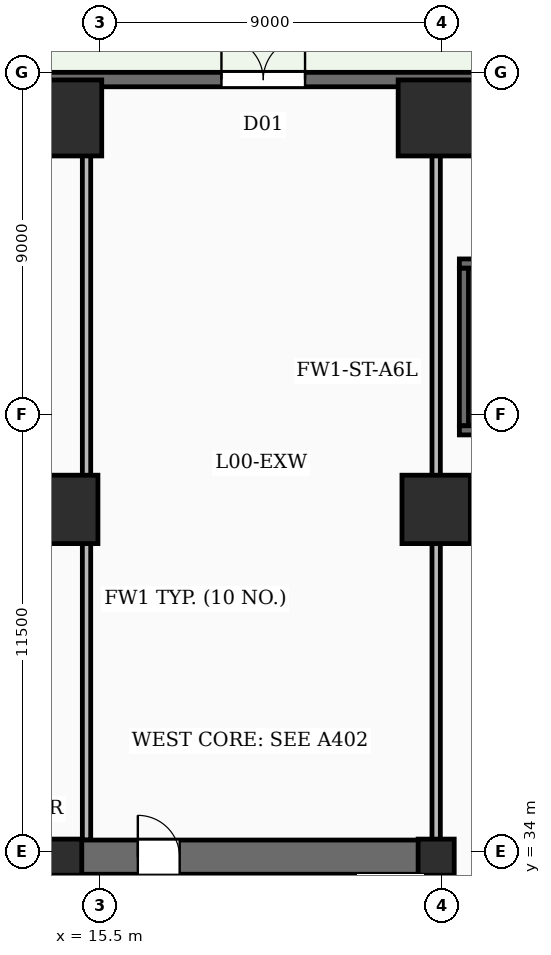
"""IFC4 building model, lengths in metres.
Left out: names, types, materials, properties, quantities, classifications, styles, units other than length and angle.
Written with IfcOpenShell. Run it as: python <this file> out.ifc"""

import sys

from ifc_helpers import new_model, si_unit, direction, frame, frame_2d, origin, origin_2d, place, context, subcontext, project, spatial, rectangle, circle, extrude, element, fill, save


model = new_model("IFC4")
c1 = context("Model", 3, precision=1e-05, world=origin(), true_north=direction((0.0, 1.0)))
c2 = subcontext(c1, "Body", "Model", "MODEL_VIEW")
j1 = project(units=[si_unit("LENGTHUNIT", "METRE"), si_unit("PLANEANGLEUNIT", "RADIAN")], contexts=[c1])
p1 = place(None, origin())
s1 = spatial("IfcSite", under=j1, at=p1, CompositionType="ELEMENT")
p2 = place(p1, origin())
s2 = spatial("IfcBuilding", under=s1, at=p2, CompositionType="ELEMENT")
p3 = place(p2, origin())
s3 = spatial("IfcBuildingStorey", under=s2, at=p3, CompositionType="ELEMENT", Elevation=0.0)
p4 = place(p3, frame((14.55, 19.0, -0.45), z_axis=(0.0, 0.0, 1.0), x_axis=(0.0, 1.0, 0.0)))
e1 = element("IfcWall", 1, at=p4, inside=s3, PredefinedType="SHEAR", context=c2, shape_type="SweptSolid", body=[
    extrude(rectangle(XDim=15.3, YDim=0.9, at=frame_2d((7.65, 0.0))), origin(), (0.0, 0.0, 1.0), 8.1),
])
p5 = place(p3, frame((24.35, 19.0, -0.45), z_axis=(0.0, 0.0, 1.0), x_axis=(0.0, 1.0, 0.0)))
e2 = element("IfcWall", 2, at=p5, inside=s3, PredefinedType="SHEAR", context=c2, shape_type="SweptSolid", body=[
    extrude(rectangle(XDim=15.3, YDim=0.9, at=frame_2d((7.65, 0.0))), origin(), (0.0, 0.0, 1.0), 8.1),
])
p6 = place(p5, frame((2.5, 0.0, 0.45)))
e3 = element("IfcOpeningElement", 3, at=p6, cuts=e2, PredefinedType="OPENING", context=c2, shape_type="SweptSolid", body=[
    extrude(rectangle(XDim=1.05, YDim=2.15, at=frame_2d((0.525, 1.075))), frame((0.0, 0.46, 0.0), z_axis=(0.0, -1.0, 0.0), x_axis=(1.0, 0.0, 0.0)), (0.0, 0.0, 1.0), 0.92),
])
p7 = place(p5, frame((7.0, 0.0, 0.45)))
e4 = element("IfcOpeningElement", 4, at=p7, cuts=e2, PredefinedType="OPENING", context=c2, shape_type="SweptSolid", body=[
    extrude(rectangle(XDim=1.05, YDim=2.15, at=frame_2d((0.525, 1.075))), frame((0.0, 0.46, 0.0), z_axis=(0.0, -1.0, 0.0), x_axis=(1.0, 0.0, 0.0)), (0.0, 0.0, 1.0), 0.92),
])
p8 = place(p3, frame((15.0, 33.85, -0.45), z_axis=(0.0, 0.0, 1.0), x_axis=(1.0, 0.0, 0.0)))
e5 = element("IfcWall", 5, at=p8, inside=s3, PredefinedType="SHEAR", context=c2, shape_type="SweptSolid", body=[
    extrude(rectangle(XDim=8.9, YDim=0.9, at=frame_2d((4.45, 0.0))), origin(), (0.0, 0.0, 1.0), 8.1),
])
p9 = place(p8, frame((1.5, 0.0, 0.45)))
e6 = element("IfcOpeningElement", 6, at=p9, cuts=e5, PredefinedType="OPENING", context=c2, shape_type="SweptSolid", body=[
    extrude(rectangle(XDim=1.1, YDim=2.15, at=frame_2d((0.55, 1.075))), frame((0.0, 0.46, 0.0), z_axis=(0.0, -1.0, 0.0), x_axis=(1.0, 0.0, 0.0)), (0.0, 0.0, 1.0), 0.92),
])
for number, where, z_axis, x_axis in (
    (7, (14.55, 33.85, -0.45), (0.0, 0.0, 1.0), (1.0, 0.0, 0.0)),
    (8, (24.35, 33.85, -0.45), (0.0, 0.0, 1.0), (1.0, 0.0, 0.0)),
):
    element("IfcColumn", number, at=place(p3, frame(where, z_axis=z_axis, x_axis=x_axis)), inside=s3, PredefinedType="COLUMN", context=c2, shape_type="SweptSolid", body=[
        extrude(rectangle(XDim=0.95, YDim=0.95, at=origin_2d()), origin(), (0.0, 0.0, 1.0), 8.1),
    ])
for number, where, z_axis, x_axis in (
    (9, (24.35, 53.3, -0.45), (0.0, 0.0, 1.0), (1.0, 0.0, 0.0)),
    (10, (14.55, 53.3, -0.45), (0.0, 0.0, 1.0), (1.0, 0.0, 0.0)),
):
    element("IfcColumn", number, at=place(p3, frame(where, z_axis=z_axis, x_axis=x_axis)), inside=s3, PredefinedType="COLUMN", context=c2, shape_type="SweptSolid", body=[
        extrude(circle(Radius=1.0, at=origin_2d()), origin(), (0.0, 0.0, 1.0), 8.1),
    ])
for number, where, z_axis, x_axis in (
    (11, (14.55, 43.0, -0.45), (0.0, 0.0, 1.0), (1.0, 0.0, 0.0)),
    (12, (24.35, 43.0, -0.45), (0.0, 0.0, 1.0), (1.0, 0.0, 0.0)),
):
    element("IfcColumn", number, at=place(p3, frame(where, z_axis=z_axis, x_axis=x_axis)), inside=s3, PredefinedType="COLUMN", context=c2, shape_type="SweptSolid", body=[
        extrude(circle(Radius=0.9, at=origin_2d()), origin(), (0.0, 0.0, 1.0), 8.1),
    ])
p10 = place(p3, frame((5.4, 54.31, 0.0), z_axis=(0.0, 0.0, 1.0), x_axis=(1.0, 0.0, 0.0)))
e13 = element("IfcWall", 13, at=p10, inside=s3, PredefinedType="SOLIDWALL", context=c2, shape_type="SweptSolid", body=[
    extrude(rectangle(XDim=68.7, YDim=0.38, at=frame_2d((34.35, 0.0))), origin(), (0.0, 0.0, 1.0), 7.65),
])
p11 = place(p10, frame((63.05, 0.0, 0.0)))
e14 = element("IfcOpeningElement", 14, at=p11, cuts=e13, PredefinedType="OPENING", context=c2, shape_type="SweptSolid", body=[
    extrude(rectangle(XDim=4.2, YDim=3.2, at=frame_2d((2.1, 1.6))), frame((0.0, 0.2, 0.0), z_axis=(0.0, -1.0, 0.0), x_axis=(1.0, 0.0, 0.0)), (0.0, 0.0, 1.0), 0.4),
])
p12 = place(p10, frame((13.3, 0.0, 0.0)))
e15 = element("IfcOpeningElement", 15, at=p12, cuts=e13, PredefinedType="OPENING", context=c2, shape_type="SweptSolid", body=[
    extrude(rectangle(XDim=2.2, YDim=2.4, at=frame_2d((1.1, 1.2))), frame((0.0, 0.2, 0.0), z_axis=(0.0, -1.0, 0.0), x_axis=(1.0, 0.0, 0.0)), (0.0, 0.0, 1.0), 0.4),
])
p13 = place(p10, frame((25.5, 0.0, 0.0)))
e16 = element("IfcOpeningElement", 16, at=p13, cuts=e13, PredefinedType="OPENING", context=c2, shape_type="SweptSolid", body=[
    extrude(rectangle(XDim=2.2, YDim=2.4, at=frame_2d((1.1, 1.2))), frame((0.0, 0.2, 0.0), z_axis=(0.0, -1.0, 0.0), x_axis=(1.0, 0.0, 0.0)), (0.0, 0.0, 1.0), 0.4),
])
p14 = place(p10, frame((38.5, 0.0, 0.0)))
e17 = element("IfcOpeningElement", 17, at=p14, cuts=e13, PredefinedType="OPENING", context=c2, shape_type="SweptSolid", body=[
    extrude(rectangle(XDim=2.2, YDim=2.4, at=frame_2d((1.1, 1.2))), frame((0.0, 0.2, 0.0), z_axis=(0.0, -1.0, 0.0), x_axis=(1.0, 0.0, 0.0)), (0.0, 0.0, 1.0), 0.4),
])
p15 = place(p10, frame((48.5, 0.0, 0.0)))
e18 = element("IfcOpeningElement", 18, at=p15, cuts=e13, PredefinedType="OPENING", context=c2, shape_type="SweptSolid", body=[
    extrude(rectangle(XDim=2.2, YDim=2.4, at=frame_2d((1.1, 1.2))), frame((0.0, 0.2, 0.0), z_axis=(0.0, -1.0, 0.0), x_axis=(1.0, 0.0, 0.0)), (0.0, 0.0, 1.0), 0.4),
])
p16 = place(p10, frame((57.0, 0.0, 0.0)))
e19 = element("IfcOpeningElement", 19, at=p16, cuts=e13, PredefinedType="OPENING", context=c2, shape_type="SweptSolid", body=[
    extrude(rectangle(XDim=2.2, YDim=2.4, at=frame_2d((1.1, 1.2))), frame((0.0, 0.2, 0.0), z_axis=(0.0, -1.0, 0.0), x_axis=(1.0, 0.0, 0.0)), (0.0, 0.0, 1.0), 0.4),
])
p17 = place(p3, frame((34.84, 45.08, 0.0), z_axis=(0.0, 0.0, 1.0), x_axis=(-1.0, 0.0, 0.0)))
e20 = element("IfcWall", 20, at=p17, inside=s3, PredefinedType="SOLIDWALL", context=c2, shape_type="SweptSolid", body=[
    extrude(rectangle(XDim=9.88, YDim=0.24, at=frame_2d((4.94, 0.0))), origin(), (0.0, 0.0, 1.0), 7.65),
])
p18 = place(p17, frame((8.09, 0.0, 0.0)))
e21 = element("IfcOpeningElement", 21, at=p18, cuts=e20, PredefinedType="OPENING", context=c2, shape_type="SweptSolid", body=[
    extrude(rectangle(XDim=1.1, YDim=2.15, at=frame_2d((0.55, 1.075))), frame((0.0, 0.13, 0.0), z_axis=(0.0, -1.0, 0.0), x_axis=(1.0, 0.0, 0.0)), (0.0, 0.0, 1.0), 0.26),
])
p19 = place(p3, frame((24.96, 49.47, 0.0), z_axis=(0.0, 0.0, 1.0), x_axis=(1.0, 0.0, 0.0)))
e22 = element("IfcWall", 22, at=p19, inside=s3, PredefinedType="SOLIDWALL", context=c2, shape_type="SweptSolid", body=[
    extrude(rectangle(XDim=9.88, YDim=0.24, at=frame_2d((4.94, 0.0))), origin(), (0.0, 0.0, 1.0), 7.65),
])
p20 = place(p3, frame((25.08, 45.2, 0.0), z_axis=(0.0, 0.0, 1.0), x_axis=(0.0, 1.0, 0.0)))
e23 = element("IfcWall", 23, at=p20, inside=s3, PredefinedType="SOLIDWALL", context=c2, shape_type="SweptSolid", body=[
    extrude(rectangle(XDim=4.15, YDim=0.24, at=frame_2d((2.075, 0.0))), origin(), (0.0, 0.0, 1.0), 7.65),
])
for number, where, z_axis, x_axis in (
    (24, (15.15, 34.3, 0.0), (0.0, 0.0, 1.0), (0.0, 1.0, 0.0)),
    (25, (24.35, 34.3, 0.0), (0.0, 0.0, 1.0), (0.0, 1.0, 0.0)),
):
    element("IfcWall", number, at=place(p3, frame(where, z_axis=z_axis, x_axis=x_axis)), inside=s3, PredefinedType="SOLIDWALL", context=c2, shape_type="SweptSolid", body=[
        extrude(rectangle(XDim=19.8, YDim=0.22, at=frame_2d((9.9, 0.0))), origin(), (0.0, 0.0, 1.0), 6.71),
    ])
p21 = place(p3, frame((24.7, 42.55, 0.0), z_axis=(0.0, 0.0, 1.0), x_axis=(1.0, 0.0, 0.0)))
e26 = element("IfcWall", 26, at=p21, inside=s3, PredefinedType="PARTITIONING", context=c2, shape_type="SweptSolid", body=[
    extrude(rectangle(XDim=25.6, YDim=0.16, at=frame_2d((12.8, 0.0))), origin(), (0.0, 0.0, 1.0), 6.71),
])
p22 = place(p21, frame((4.2, 0.0, 0.0)))
e27 = element("IfcOpeningElement", 27, at=p22, cuts=e26, PredefinedType="OPENING", context=c2, shape_type="SweptSolid", body=[
    extrude(rectangle(XDim=1.1, YDim=2.15, at=frame_2d((0.55, 1.075))), frame((0.0, 0.09, 0.0), z_axis=(0.0, -1.0, 0.0), x_axis=(1.0, 0.0, 0.0)), (0.0, 0.0, 1.0), 0.18),
])
p23 = place(p21, frame((18.2, 0.0, 0.0)))
e28 = element("IfcOpeningElement", 28, at=p23, cuts=e26, PredefinedType="OPENING", context=c2, shape_type="SweptSolid", body=[
    extrude(rectangle(XDim=1.1, YDim=2.15, at=frame_2d((0.55, 1.075))), frame((0.0, 0.09, 0.0), z_axis=(0.0, -1.0, 0.0), x_axis=(1.0, 0.0, 0.0)), (0.0, 0.0, 1.0), 0.18),
])
p24 = place(p12, origin())
e29 = element("IfcDoor", 29, at=p24, inside=s3, OperationType="DOUBLE_DOOR_SINGLE_SWING", PredefinedType="DOOR", context=c2, shape_type="SweptSolid", body=[
    extrude(rectangle(XDim=2.2, YDim=2.4, at=frame_2d((1.1, 1.2))), frame((0.0, 0.025, 0.0), z_axis=(0.0, -1.0, 0.0), x_axis=(1.0, 0.0, 0.0)), (0.0, 0.0, 1.0), 0.05),
])
fill(e15, e29)
p25 = place(p9, origin())
e30 = element("IfcDoor", 30, at=p25, inside=s3, OperationType="SINGLE_SWING_LEFT", PredefinedType="DOOR", context=c2, shape_type="SweptSolid", body=[
    extrude(rectangle(XDim=1.1, YDim=2.15, at=frame_2d((0.55, 1.075))), frame((0.0, 0.025, 0.0), z_axis=(0.0, -1.0, 0.0), x_axis=(1.0, 0.0, 0.0)), (0.0, 0.0, 1.0), 0.05),
])
fill(e6, e30)
save(model, sys.argv[1])
